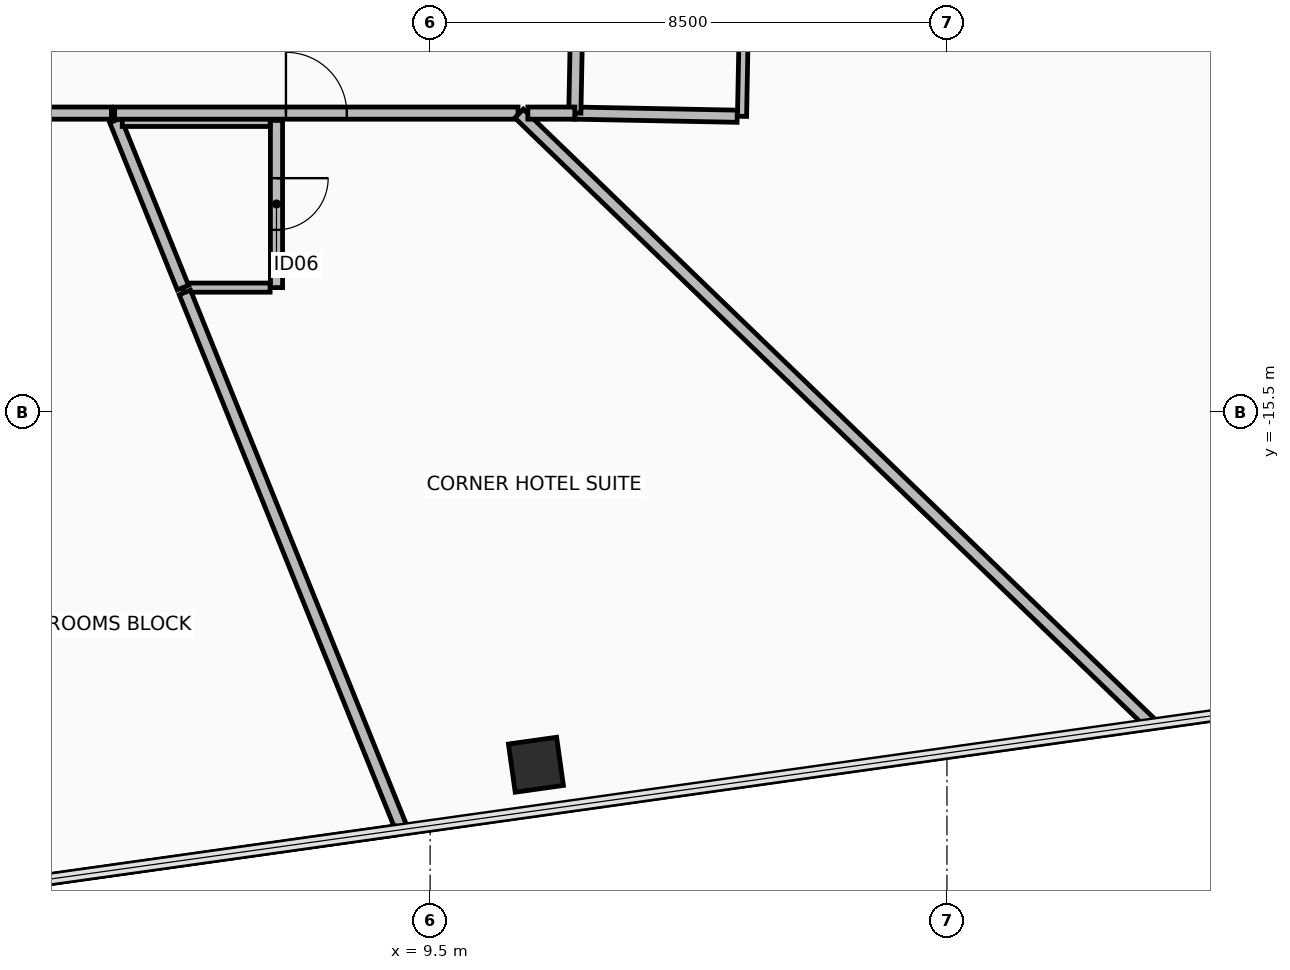
"""IFC4 building model, lengths in metres.
Left out: names, types, materials, properties, quantities, classifications, styles, units other than length and angle.
Written with IfcOpenShell. Run it as: python <this file> out.ifc"""

import sys

from ifc_helpers import new_model, si_unit, direction, frame, frame_2d, origin, origin_2d, place, context, subcontext, project, spatial, rectangle, hollow_rectangle, extrude, element, fill, save


model = new_model("IFC4")
c1 = context("Model", 3, precision=1e-05, world=origin(), true_north=direction((0.0, 1.0)))
c2 = subcontext(c1, "Body", "Model", "MODEL_VIEW")
j1 = project(units=[si_unit("LENGTHUNIT", "METRE"), si_unit("PLANEANGLEUNIT", "RADIAN")], contexts=[c1])
p1 = place(None, origin())
s1 = spatial("IfcSite", under=j1, at=p1, CompositionType="ELEMENT")
p2 = place(p1, origin())
s2 = spatial("IfcBuilding", under=s1, at=p2, CompositionType="ELEMENT")
p3 = place(p2, frame((0.0, 0.0, 70.75)))
s3 = spatial("IfcBuildingStorey", under=s2, at=p3, CompositionType="ELEMENT", Elevation=70.75)
p4 = place(p3, frame((11.24, -21.296, 0.0), z_axis=(0.0, 0.0, 1.0), x_axis=(0.990268068742, 0.13917310096, 0.0)))
e1 = element("IfcColumn", 1, at=p4, inside=s3, PredefinedType="COLUMN", context=c2, shape_type="SweptSolid", body=[
    extrude(hollow_rectangle(XDim=0.8, YDim=0.8, WallThickness=0.045, at=origin_2d()), origin(), (0.0, 0.0, 1.0), 3.45),
])
p5 = place(p3, frame((6.973, -10.7, 0.0), z_axis=(0.0, 0.0, 1.0), x_axis=(0.0, -1.0, 0.0)))
e2 = element("IfcWall", 2, at=p5, inside=s3, PredefinedType="PARTITIONING", context=c2, shape_type="SweptSolid", body=[
    extrude(rectangle(XDim=2.75, YDim=0.2, at=frame_2d((1.375, 0.0))), origin(), (0.0, 0.0, 1.0), 3.275),
])
p6 = place(p5, frame((0.95, 0.0, 0.0)))
e3 = element("IfcOpeningElement", 3, at=p6, cuts=e2, PredefinedType="OPENING", context=c2, shape_type="SweptSolid", body=[
    extrude(rectangle(XDim=0.85, YDim=2.1, at=frame_2d((0.425, 1.05))), frame((0.0, 0.11, 0.0), z_axis=(0.0, -1.0, 0.0), x_axis=(1.0, 0.0, 0.0)), (0.0, 0.0, 1.0), 0.22),
])
p7 = place(p3, frame((6.868, -13.45, 0.0), z_axis=(0.0, 0.0, 1.0), x_axis=(-1.0, 0.0, 0.0)))
e4 = element("IfcWall", 4, at=p7, inside=s3, PredefinedType="PARTITIONING", context=c2, shape_type="SweptSolid", body=[
    extrude(rectangle(XDim=1.434, YDim=0.15, at=frame_2d((0.717, 0.0))), origin(), (0.0, 0.0, 1.0), 3.275),
])
p8 = place(p3, frame((5.434, -13.45, 0.0), z_axis=(0.0, 0.0, 1.0), x_axis=(-0.374610031927, 0.927182465311, 0.0)))
e5 = element("IfcWall", 5, at=p8, inside=s3, PredefinedType="PARTITIONING", context=c2, shape_type="SweptSolid", body=[
    extrude(rectangle(XDim=2.966, YDim=0.2, at=frame_2d((1.483, 0.0))), origin(), (0.0, 0.0, 1.0), 3.275),
])
p9 = place(p3, frame((4.436, -10.7, 0.0), z_axis=(0.0, 0.0, 1.0), x_axis=(1.0, 0.0, 0.0)))
e6 = element("IfcWall", 6, at=p9, inside=s3, PredefinedType="PARTITIONING", context=c2, shape_type="SweptSolid", body=[
    extrude(rectangle(XDim=2.432, YDim=0.2, at=frame_2d((1.216, 0.0))), origin(), (0.0, 0.0, 1.0), 3.275),
])
p10 = place(p3, frame((14.681, -7.984, 0.0), z_axis=(0.0, 0.0, 1.0), x_axis=(-0.01934764942, -0.999812816712, 0.0)))
e7 = element("IfcWall", 7, at=p10, inside=s3, PredefinedType="PARTITIONING", context=c2, shape_type="SweptSolid", body=[
    extrude(rectangle(XDim=2.65, YDim=0.15, at=frame_2d((1.325, 0.0))), origin(), (0.0, 0.0, 1.0), 2.67),
])
p11 = place(p3, frame((14.55, -10.632, 0.0), z_axis=(0.0, 0.0, 1.0), x_axis=(-0.999813887268, 0.019292247848, 0.0)))
e8 = element("IfcWall", 8, at=p11, inside=s3, PredefinedType="PARTITIONING", context=c2, shape_type="SweptSolid", body=[
    extrude(rectangle(XDim=2.67, YDim=0.2, at=frame_2d((1.335, 0.0))), origin(), (0.0, 0.0, 1.0), 2.67),
])
p12 = place(p3, frame((11.88, -10.579, 0.0), z_axis=(0.0, 0.0, 1.0), x_axis=(0.019356564513, 0.999812644154, 0.0)))
e9 = element("IfcWall", 9, at=p12, inside=s3, PredefinedType="PARTITIONING", context=c2, shape_type="SweptSolid", body=[
    extrude(rectangle(XDim=2.649, YDim=0.2, at=frame_2d((1.324, 0.0))), origin(), (0.0, 0.0, 1.0), 2.67),
])
p13 = place(p3, frame((-0.345, -10.58, 0.0), z_axis=(0.0, 0.0, 1.0), x_axis=(1.0, 0.0, 0.0)))
e10 = element("IfcWall", 10, at=p13, inside=s3, PredefinedType="PARTITIONING", context=c2, shape_type="SweptSolid", body=[
    extrude(rectangle(XDim=4.603, YDim=0.2, at=frame_2d((2.302, 0.0))), origin(), (0.0, 0.0, 1.0), 3.275),
])
p14 = place(p13, frame((1.876, 0.0, 0.0)))
e11 = element("IfcOpeningElement", 11, at=p14, cuts=e10, PredefinedType="OPENING", context=c2, shape_type="SweptSolid", body=[
    extrude(rectangle(XDim=0.85, YDim=2.1, at=frame_2d((0.425, 1.05))), frame((0.0, 0.11, 0.0), z_axis=(0.0, -1.0, 0.0), x_axis=(1.0, 0.0, 0.0)), (0.0, 0.0, 1.0), 0.22),
])
p15 = place(p3, frame((5.467, -13.53, 0.0), z_axis=(0.0, 0.0, 1.0), x_axis=(0.374604987926, -0.927184503225, 0.0)))
e12 = element("IfcWall", 12, at=p15, inside=s3, PredefinedType="PARTITIONING", context=c2, shape_type="SweptSolid", body=[
    extrude(rectangle(XDim=9.527, YDim=0.2, at=frame_2d((4.763, 0.0))), origin(), (0.0, 0.0, 1.0), 2.47),
])
p16 = place(p3, frame((8.928, -22.378, 0.0), z_axis=(0.0, 0.0, 1.0), x_axis=(-0.990268034831, -0.139173342244, 0.0)))
e13 = element("IfcWall", 13, at=p16, inside=s3, PredefinedType="PARTITIONING", context=c2, shape_type="SweptSolid", body=[
    extrude(rectangle(XDim=9.824, YDim=0.15, at=frame_2d((4.912, 0.0))), origin(), (0.0, 0.0, 1.0), 3.275),
])
p17 = place(p3, frame((4.312, -10.58, 0.0), z_axis=(0.0, 0.0, 1.0), x_axis=(1.0, 0.0, 0.0)))
e14 = element("IfcWall", 14, at=p17, inside=s3, PredefinedType="PARTITIONING", context=c2, shape_type="SweptSolid", body=[
    extrude(rectangle(XDim=6.634, YDim=0.2, at=frame_2d((3.317, 0.0))), origin(), (0.0, 0.0, 1.0), 2.67),
])
p18 = place(p17, frame((2.817, 0.0, 0.0)))
e15 = element("IfcOpeningElement", 15, at=p18, cuts=e14, PredefinedType="OPENING", context=c2, shape_type="SweptSolid", body=[
    extrude(rectangle(XDim=1.0, YDim=2.15, at=frame_2d((0.5, 1.075))), frame((0.0, 0.11, 0.0), z_axis=(0.0, -1.0, 0.0), x_axis=(1.0, 0.0, 0.0)), (0.0, 0.0, 1.0), 0.22),
])
p19 = place(p3, frame((10.963, -10.587, 0.0), z_axis=(0.0, 0.0, 1.0), x_axis=(0.719333957275, -0.694664421077, 0.0)))
e16 = element("IfcWall", 16, at=p19, inside=s3, PredefinedType="PARTITIONING", context=c2, shape_type="SweptSolid", body=[
    extrude(rectangle(XDim=14.459, YDim=0.2, at=frame_2d((7.229, 0.0))), origin(), (0.0, 0.0, 1.0), 2.47),
])
p20 = place(p3, frame((16.71, -6.082, 0.0), z_axis=(0.0, 0.0, 1.0), x_axis=(0.939695147998, -0.342013199789, 0.0)))
e17 = element("IfcWall", 17, at=p20, inside=s3, PredefinedType="PARTITIONING", context=c2, shape_type="SweptSolid", body=[
    extrude(rectangle(XDim=11.827, YDim=0.2, at=frame_2d((5.914, 0.0))), origin(), (0.0, 0.0, 1.0), 2.47),
])
p21 = place(p3, frame((11.107, -10.58, 0.0), z_axis=(0.0, 0.0, 1.0), x_axis=(1.0, 0.0, 0.0)))
e18 = element("IfcWall", 18, at=p21, inside=s3, PredefinedType="PARTITIONING", context=c2, shape_type="SweptSolid", body=[
    extrude(rectangle(XDim=0.772, YDim=0.2, at=frame_2d((0.386, 0.0))), origin(), (0.0, 0.0, 1.0), 3.275),
])
p22 = place(p6, origin())
e19 = element("IfcDoor", 19, at=p22, inside=s3, OperationType="SINGLE_SWING_RIGHT", PredefinedType="DOOR", context=c2, shape_type="SweptSolid", body=[
    extrude(rectangle(XDim=0.85, YDim=2.1, at=frame_2d((0.425, 1.05))), frame((0.0, 0.025, 0.0), z_axis=(0.0, -1.0, 0.0), x_axis=(1.0, 0.0, 0.0)), (0.0, 0.0, 1.0), 0.05),
])
fill(e3, e19)
p23 = place(p18, origin())
e20 = element("IfcDoor", 20, at=p23, inside=s3, OperationType="SINGLE_SWING_LEFT", PredefinedType="DOOR", context=c2, shape_type="SweptSolid", body=[
    extrude(rectangle(XDim=1.0, YDim=2.15, at=frame_2d((0.5, 1.075))), frame((0.0, 0.025, 0.0), z_axis=(0.0, -1.0, 0.0), x_axis=(1.0, 0.0, 0.0)), (0.0, 0.0, 1.0), 0.05),
])
fill(e15, e20)
save(model, sys.argv[1])
